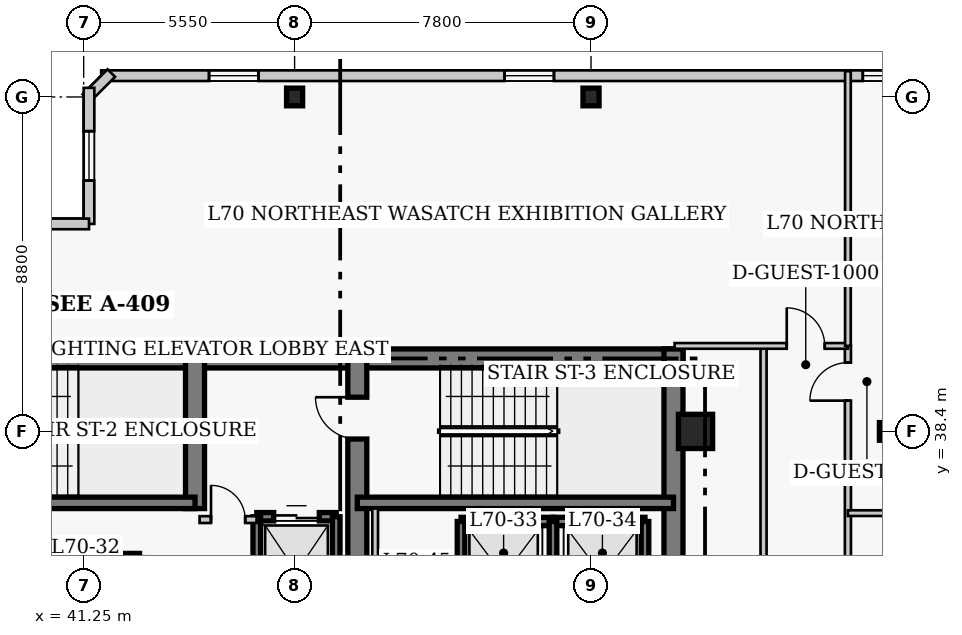
"""IFC4 building model, lengths in metres.
Left out: names, types, materials, properties, quantities, classifications, styles, units other than length and angle.
Written with IfcOpenShell. Run it as: python <this file> out.ifc"""

import sys

from ifc_helpers import new_model, si_unit, direction, frame, frame_2d, origin, origin_2d, place, context, subcontext, project, spatial, rectangle, i_section, extrude, element, fill, save


model = new_model("IFC4")
c1 = context("Model", 3, precision=1e-05, world=origin(), true_north=direction((0.0, 1.0)))
c2 = subcontext(c1, "Body", "Model", "MODEL_VIEW")
j1 = project(units=[si_unit("LENGTHUNIT", "METRE"), si_unit("PLANEANGLEUNIT", "RADIAN")], contexts=[c1])
p1 = place(None, origin())
s1 = spatial("IfcSite", under=j1, at=p1, CompositionType="ELEMENT")
p2 = place(p1, origin())
s2 = spatial("IfcBuilding", under=s1, at=p2, CompositionType="ELEMENT")
p3 = place(p2, frame((0.0, 0.0, 281.4)))
s3 = spatial("IfcBuildingStorey", under=s2, at=p3, CompositionType="ELEMENT", Elevation=281.4)
p4 = place(p3, frame((35.85, 40.32, 0.0), z_axis=(0.0, 0.0, 1.0), x_axis=(1.0, 0.0, 0.0)))
e1 = element("IfcWall", 1, at=p4, inside=s3, PredefinedType="SHEAR", context=c2, shape_type="SweptSolid", body=[
    extrude(rectangle(XDim=12.6, YDim=0.5, at=frame_2d((6.3, 0.0))), origin(), (0.0, 0.0, 1.0), 4.0),
])
p5 = place(p3, frame((48.45, 40.32, 0.0), z_axis=(0.0, 0.0, 1.0), x_axis=(1.0, 0.0, 0.0)))
e2 = element("IfcWall", 2, at=p5, inside=s3, PredefinedType="SHEAR", context=c2, shape_type="SweptSolid", body=[
    extrude(rectangle(XDim=8.57, YDim=0.5, at=frame_2d((4.285, 0.0))), origin(), (0.0, 0.0, 1.0), 4.0),
])
p6 = place(p3, frame((56.77, 27.05, 0.0), z_axis=(0.0, 0.0, 1.0), x_axis=(0.0, 1.0, 0.0)))
e3 = element("IfcWall", 3, at=p6, inside=s3, PredefinedType="SHEAR", context=c2, shape_type="SweptSolid", body=[
    extrude(rectangle(XDim=13.52, YDim=0.5, at=frame_2d((6.76, 0.0))), origin(), (0.0, 0.0, 1.0), 4.0),
])
p7 = place(p3, frame((44.18, 36.37, 0.0), z_axis=(0.0, 0.0, 1.0), x_axis=(0.0, 1.0, 0.0)))
e4 = element("IfcWall", 4, at=p7, inside=s3, PredefinedType="SHEAR", context=c2, shape_type="SweptSolid", body=[
    extrude(rectangle(XDim=3.95, YDim=0.5, at=frame_2d((1.975, 0.0))), origin(), (0.0, 0.0, 1.0), 4.0),
])
p8 = place(p3, frame((48.45, 32.5, 0.0), z_axis=(0.0, 0.0, 1.0), x_axis=(0.0, 1.0, 0.0)))
e5 = element("IfcWall", 5, at=p8, inside=s3, PredefinedType="SHEAR", context=c2, shape_type="SweptSolid", body=[
    extrude(rectangle(XDim=7.82, YDim=0.5, at=frame_2d((3.91, 0.0))), origin(), (0.0, 0.0, 1.0), 4.0),
])
p9 = place(p8, frame((5.7, 0.0, 0.0)))
e6 = element("IfcOpeningElement", 6, at=p9, cuts=e5, PredefinedType="OPENING", context=c2, shape_type="SweptSolid", body=[
    extrude(rectangle(XDim=1.1, YDim=2.15, at=frame_2d((0.55, 1.075))), frame((0.0, 0.26, 0.0), z_axis=(0.0, -1.0, 0.0), x_axis=(1.0, 0.0, 0.0)), (0.0, 0.0, 1.0), 0.52),
])
p10 = place(p3, frame((35.85, 36.52, 0.0), z_axis=(0.0, 0.0, 1.0), x_axis=(1.0, 0.0, 0.0)))
e7 = element("IfcWall", 7, at=p10, inside=s3, PredefinedType="SHEAR", context=c2, shape_type="SweptSolid", body=[
    extrude(rectangle(XDim=8.33, YDim=0.3, at=frame_2d((4.165, 0.0))), origin(), (0.0, 0.0, 1.0), 4.0),
])
p11 = place(p3, frame((48.45, 36.52, 0.0), z_axis=(0.0, 0.0, 1.0), x_axis=(1.0, 0.0, 0.0)))
e8 = element("IfcWall", 8, at=p11, inside=s3, PredefinedType="SHEAR", context=c2, shape_type="SweptSolid", body=[
    extrude(rectangle(XDim=8.32, YDim=0.3, at=frame_2d((4.16, 0.0))), origin(), (0.0, 0.0, 1.0), 4.0),
])
for number, where, z_axis, x_axis in (
    (9, (46.8, 47.2, 0.0), (0.0, 0.0, 1.0), (1.0, 0.0, 0.0)),
    (10, (54.6, 47.2, 0.0), (0.0, 0.0, 1.0), (1.0, 0.0, 0.0)),
    (11, (62.4, 38.4, 0.0), (0.0, 0.0, 1.0), (1.0, 0.0, 0.0)),
):
    element("IfcColumn", number, at=place(p3, frame(where, z_axis=z_axis, x_axis=x_axis)), inside=s3, PredefinedType="COLUMN", context=c2, shape_type="SweptSolid", body=[
        extrude(i_section(OverallWidth=0.422, OverallDepth=0.465, WebThickness=0.045, FlangeThickness=0.073, FilletRadius=0.017, at=origin_2d()), origin(), (0.0, 0.0, 1.0), 4.0),
    ])
p12 = place(p3, frame((57.35, 38.4, 0.0), z_axis=(0.0, 0.0, 1.0), x_axis=(1.0, 0.0, 0.0)))
e12 = element("IfcColumn", 12, at=p12, inside=s3, PredefinedType="COLUMN", context=c2, shape_type="SweptSolid", body=[
    extrude(rectangle(XDim=0.9, YDim=0.9, at=origin_2d()), origin(), (0.0, 0.0, 1.0), 4.0),
])
p13 = place(p3, frame((66.54, 47.76, 0.0), z_axis=(0.0, 0.0, 1.0), x_axis=(-1.0, 0.0, 0.0)))
e13 = element("IfcWall", 13, at=p13, inside=s3, PredefinedType="SOLIDWALL", context=c2, shape_type="SweptSolid", body=[
    extrude(rectangle(XDim=24.83, YDim=0.28, at=frame_2d((12.415, 0.0))), origin(), (0.0, 0.0, 1.0), 3.76),
])
p14 = place(p13, frame((3.488, 0.0, 0.85)))
e14 = element("IfcOpeningElement", 14, at=p14, cuts=e13, PredefinedType="OPENING", context=c2, shape_type="SweptSolid", body=[
    extrude(rectangle(XDim=1.3, YDim=1.7, at=frame_2d((0.65, 0.85))), frame((0.0, 0.15, 0.0), z_axis=(0.0, -1.0, 0.0), x_axis=(1.0, 0.0, 0.0)), (0.0, 0.0, 1.0), 0.3),
])
p15 = place(p13, frame((12.915, 0.0, 0.85)))
e15 = element("IfcOpeningElement", 15, at=p15, cuts=e13, PredefinedType="OPENING", context=c2, shape_type="SweptSolid", body=[
    extrude(rectangle(XDim=1.3, YDim=1.7, at=frame_2d((0.65, 0.85))), frame((0.0, 0.15, 0.0), z_axis=(0.0, -1.0, 0.0), x_axis=(1.0, 0.0, 0.0)), (0.0, 0.0, 1.0), 0.3),
])
p16 = place(p13, frame((20.692, 0.0, 0.85)))
e16 = element("IfcOpeningElement", 16, at=p16, cuts=e13, PredefinedType="OPENING", context=c2, shape_type="SweptSolid", body=[
    extrude(rectangle(XDim=1.3, YDim=1.7, at=frame_2d((0.65, 0.85))), frame((0.0, 0.15, 0.0), z_axis=(0.0, -1.0, 0.0), x_axis=(1.0, 0.0, 0.0)), (0.0, 0.0, 1.0), 0.3),
])
p17 = place(p3, frame((41.977, 47.829, 0.0), z_axis=(0.0, 0.0, 1.0), x_axis=(-0.706975312048, -0.707238225886, 0.0)))
e17 = element("IfcWall", 17, at=p17, inside=s3, PredefinedType="SOLIDWALL", context=c2, shape_type="SweptSolid", body=[
    extrude(rectangle(XDim=0.929, YDim=0.28, at=frame_2d((0.464, 0.0))), origin(), (0.0, 0.0, 1.0), 3.76),
])
p18 = place(p3, frame((41.39, 47.44, 0.0), z_axis=(0.0, 0.0, 1.0), x_axis=(0.0, -1.0, 0.0)))
e18 = element("IfcWall", 18, at=p18, inside=s3, PredefinedType="SOLIDWALL", context=c2, shape_type="SweptSolid", body=[
    extrude(rectangle(XDim=3.58, YDim=0.28, at=frame_2d((1.79, 0.0))), origin(), (0.0, 0.0, 1.0), 3.76),
])
p19 = place(p18, frame((1.14, 0.0, 0.85)))
e19 = element("IfcOpeningElement", 19, at=p19, cuts=e18, PredefinedType="OPENING", context=c2, shape_type="SweptSolid", body=[
    extrude(rectangle(XDim=1.3, YDim=1.7, at=frame_2d((0.65, 0.85))), frame((0.0, 0.15, 0.0), z_axis=(0.0, -1.0, 0.0), x_axis=(1.0, 0.0, 0.0)), (0.0, 0.0, 1.0), 0.3),
])
p20 = place(p3, frame((41.39, 43.86, 0.0), z_axis=(0.0, 0.0, 1.0), x_axis=(-1.0, 0.0, 0.0)))
e20 = element("IfcWall", 20, at=p20, inside=s3, PredefinedType="SOLIDWALL", context=c2, shape_type="SweptSolid", body=[
    extrude(rectangle(XDim=4.78, YDim=0.28, at=frame_2d((2.39, 0.0))), origin(), (0.0, 0.0, 1.0), 3.76),
])
p21 = place(p20, frame((1.74, 0.0, 0.85)))
e21 = element("IfcOpeningElement", 21, at=p21, cuts=e20, PredefinedType="OPENING", context=c2, shape_type="SweptSolid", body=[
    extrude(rectangle(XDim=1.3, YDim=1.7, at=frame_2d((0.65, 0.85))), frame((0.0, 0.15, 0.0), z_axis=(0.0, -1.0, 0.0), x_axis=(1.0, 0.0, 0.0)), (0.0, 0.0, 1.0), 0.3),
])
p22 = place(p3, frame((40.4, 35.08, 0.0), z_axis=(0.0, 0.0, 1.0), x_axis=(1.0, 0.0, 0.0)))
e22 = element("IfcWall", 22, at=p22, inside=s3, PredefinedType="SHEAR", context=c2, shape_type="SweptSolid", body=[
    extrude(rectangle(XDim=2.32, YDim=0.22, at=frame_2d((1.16, 0.0))), origin(), (0.0, 0.0, 1.0), 4.0),
])
p23 = place(p3, frame((51.18, 36.03, 0.0), z_axis=(0.0, 0.0, 1.0), x_axis=(1.0, 0.0, 0.0)))
e23 = element("IfcWall", 23, at=p23, inside=s3, PredefinedType="SHEAR", context=c2, shape_type="SweptSolid", body=[
    extrude(rectangle(XDim=2.42, YDim=0.22, at=frame_2d((1.21, 0.0))), origin(), (0.0, 0.0, 1.0), 4.0),
])
p24 = place(p3, frame((51.18, 33.17, 0.0), z_axis=(0.0, 0.0, 1.0), x_axis=(0.0, 1.0, 0.0)))
e24 = element("IfcWall", 24, at=p24, inside=s3, PredefinedType="SHEAR", context=c2, shape_type="SweptSolid", body=[
    extrude(rectangle(XDim=2.86, YDim=0.2, at=frame_2d((1.43, 0.0))), origin(), (0.0, 0.0, 1.0), 4.0),
])
p25 = place(p3, frame((53.6, 36.03, 0.0), z_axis=(0.0, 0.0, 1.0), x_axis=(1.0, 0.0, 0.0)))
e25 = element("IfcWall", 25, at=p25, inside=s3, PredefinedType="SHEAR", context=c2, shape_type="SweptSolid", body=[
    extrude(rectangle(XDim=2.42, YDim=0.22, at=frame_2d((1.21, 0.0))), origin(), (0.0, 0.0, 1.0), 4.0),
])
for number, where, z_axis, x_axis in (
    (26, (53.6, 33.17, 0.0), (0.0, 0.0, 1.0), (0.0, 1.0, 0.0)),
    (27, (56.02, 33.17, 0.0), (0.0, 0.0, 1.0), (0.0, 1.0, 0.0)),
):
    element("IfcWall", number, at=place(p3, frame(where, z_axis=z_axis, x_axis=x_axis)), inside=s3, PredefinedType="SHEAR", context=c2, shape_type="SweptSolid", body=[
        extrude(rectangle(XDim=2.86, YDim=0.2, at=frame_2d((1.43, 0.0))), origin(), (0.0, 0.0, 1.0), 4.0),
    ])
p26 = place(p3, frame((45.805, 36.155, 0.0), z_axis=(0.0, 0.0, 1.0), x_axis=(1.0, 0.0, 0.0)))
e28 = element("IfcWall", 28, at=p26, inside=s3, PredefinedType="SHEAR", context=c2, shape_type="SweptSolid", body=[
    extrude(rectangle(XDim=2.09, YDim=0.22, at=frame_2d((1.045, 0.0))), origin(), (0.0, 0.0, 1.0), 4.0),
])
p27 = place(p26, frame((0.445, 0.0, 0.0)))
e29 = element("IfcOpeningElement", 29, at=p27, cuts=e28, PredefinedType="OPENING", context=c2, shape_type="SweptSolid", body=[
    extrude(rectangle(XDim=1.2, YDim=2.15, at=frame_2d((0.6, 1.075))), frame((0.0, 0.12, 0.0), z_axis=(0.0, -1.0, 0.0), x_axis=(1.0, 0.0, 0.0)), (0.0, 0.0, 1.0), 0.24),
])
p28 = place(p3, frame((45.805, 32.65, 0.0), z_axis=(0.0, 0.0, 1.0), x_axis=(0.0, 1.0, 0.0)))
e30 = element("IfcWall", 30, at=p28, inside=s3, PredefinedType="SHEAR", context=c2, shape_type="SweptSolid", body=[
    extrude(rectangle(XDim=3.505, YDim=0.2, at=frame_2d((1.752, 0.0))), origin(), (0.0, 0.0, 1.0), 4.0),
])
p29 = place(p3, frame((47.895, 33.245, 0.0), z_axis=(0.0, 0.0, 1.0), x_axis=(0.0, 1.0, 0.0)))
e31 = element("IfcWall", 31, at=p29, inside=s3, PredefinedType="SHEAR", context=c2, shape_type="SweptSolid", body=[
    extrude(rectangle(XDim=2.91, YDim=0.2, at=frame_2d((1.455, 0.0))), origin(), (0.0, 0.0, 1.0), 4.0),
])
p30 = place(p3, frame((44.3, 36.08, 0.0), z_axis=(0.0, 0.0, 1.0), x_axis=(1.0, 0.0, 0.0)))
e32 = element("IfcWall", 32, at=p30, inside=s3, PredefinedType="PARTITIONING", context=c2, shape_type="SweptSolid", body=[
    extrude(rectangle(XDim=1.5, YDim=0.18, at=frame_2d((0.75, 0.0))), origin(), (0.0, 0.0, 1.0), 3.76),
])
p31 = place(p30, frame((0.3, 0.0, 0.0)))
e33 = element("IfcOpeningElement", 33, at=p31, cuts=e32, PredefinedType="OPENING", context=c2, shape_type="SweptSolid", body=[
    extrude(rectangle(XDim=0.9, YDim=2.15, at=frame_2d((0.45, 1.075))), frame((0.0, 0.1, 0.0), z_axis=(0.0, -1.0, 0.0), x_axis=(1.0, 0.0, 0.0)), (0.0, 0.0, 1.0), 0.2),
])
p32 = place(p3, frame((48.92, 32.75, 0.0), z_axis=(0.0, 0.0, 1.0), x_axis=(0.0, 1.0, 0.0)))
e34 = element("IfcWall", 34, at=p32, inside=s3, PredefinedType="PARTITIONING", context=c2, shape_type="SweptSolid", body=[
    extrude(rectangle(XDim=3.62, YDim=0.15, at=frame_2d((1.81, 0.0))), origin(), (0.0, 0.0, 1.0), 3.76),
])
p33 = place(p3, frame((61.36, 24.9, 0.0), z_axis=(0.0, 0.0, 1.0), x_axis=(0.0, 1.0, 0.0)))
e35 = element("IfcWall", 35, at=p33, inside=s3, PredefinedType="PARTITIONING", context=c2, shape_type="SweptSolid", body=[
    extrude(rectangle(XDim=15.75, YDim=0.16, at=frame_2d((7.875, 0.0))), origin(), (0.0, 0.0, 1.0), 3.76),
])
p34 = place(p33, frame((0.46, 0.0, 0.0)))
e36 = element("IfcOpeningElement", 36, at=p34, cuts=e35, PredefinedType="OPENING", context=c2, shape_type="SweptSolid", body=[
    extrude(rectangle(XDim=0.95, YDim=2.1, at=frame_2d((0.475, 1.05))), frame((0.0, 0.09, 0.0), z_axis=(0.0, -1.0, 0.0), x_axis=(1.0, 0.0, 0.0)), (0.0, 0.0, 1.0), 0.18),
])
p35 = place(p33, frame((14.31, 0.0, 0.0)))
e37 = element("IfcOpeningElement", 37, at=p35, cuts=e35, PredefinedType="OPENING", context=c2, shape_type="SweptSolid", body=[
    extrude(rectangle(XDim=1.0, YDim=2.15, at=frame_2d((0.5, 1.075))), frame((0.0, 0.09, 0.0), z_axis=(0.0, -1.0, 0.0), x_axis=(1.0, 0.0, 0.0)), (0.0, 0.0, 1.0), 0.18),
])
p36 = place(p3, frame((59.14, 27.06, 0.0), z_axis=(0.0, 0.0, 1.0), x_axis=(0.0, 1.0, 0.0)))
e38 = element("IfcWall", 38, at=p36, inside=s3, PredefinedType="PARTITIONING", context=c2, shape_type="SweptSolid", body=[
    extrude(rectangle(XDim=13.59, YDim=0.16, at=frame_2d((6.795, 0.0))), origin(), (0.0, 0.0, 1.0), 3.76),
])
p37 = place(p3, frame((56.8, 40.65, 0.0), z_axis=(0.0, 0.0, 1.0), x_axis=(1.0, 0.0, 0.0)))
e39 = element("IfcWall", 39, at=p37, inside=s3, PredefinedType="PARTITIONING", context=c2, shape_type="SweptSolid", body=[
    extrude(rectangle(XDim=4.56, YDim=0.15, at=frame_2d((2.28, 0.0))), origin(), (0.0, 0.0, 1.0), 3.76),
])
p38 = place(p37, frame((2.95, 0.0, 0.0)))
e40 = element("IfcOpeningElement", 40, at=p38, cuts=e39, PredefinedType="OPENING", context=c2, shape_type="SweptSolid", body=[
    extrude(rectangle(XDim=1.0, YDim=2.15, at=frame_2d((0.5, 1.075))), frame((0.0, 0.085, 0.0), z_axis=(0.0, -1.0, 0.0), x_axis=(1.0, 0.0, 0.0)), (0.0, 0.0, 1.0), 0.17),
])
p39 = place(p3, frame((61.36, 40.65, 0.0), z_axis=(0.0, 0.0, 1.0), x_axis=(0.0, 1.0, 0.0)))
e41 = element("IfcWall", 41, at=p39, inside=s3, PredefinedType="PARTITIONING", context=c2, shape_type="SweptSolid", body=[
    extrude(rectangle(XDim=7.23, YDim=0.15, at=frame_2d((3.615, 0.0))), origin(), (0.0, 0.0, 1.0), 3.76),
])
p40 = place(p3, frame((61.36, 36.25, 0.0), z_axis=(0.0, 0.0, 1.0), x_axis=(1.0, 0.0, 0.0)))
e42 = element("IfcWall", 42, at=p40, inside=s3, PredefinedType="PARTITIONING", context=c2, shape_type="SweptSolid", body=[
    extrude(rectangle(XDim=3.74, YDim=0.15, at=frame_2d((1.87, 0.0))), origin(), (0.0, 0.0, 1.0), 3.76),
])
p41 = place(p14, origin())
e43 = element("IfcWindow", 43, at=p41, inside=s3, PartitioningType="SINGLE_PANEL", PredefinedType="WINDOW", context=c2, shape_type="SweptSolid", body=[
    extrude(rectangle(XDim=1.3, YDim=1.7, at=frame_2d((0.65, 0.85))), frame((0.0, 0.03, 0.0), z_axis=(0.0, -1.0, 0.0), x_axis=(1.0, 0.0, 0.0)), (0.0, 0.0, 1.0), 0.06),
])
fill(e14, e43)
p42 = place(p15, origin())
e44 = element("IfcWindow", 44, at=p42, inside=s3, PartitioningType="SINGLE_PANEL", PredefinedType="WINDOW", context=c2, shape_type="SweptSolid", body=[
    extrude(rectangle(XDim=1.3, YDim=1.7, at=frame_2d((0.65, 0.85))), frame((0.0, 0.03, 0.0), z_axis=(0.0, -1.0, 0.0), x_axis=(1.0, 0.0, 0.0)), (0.0, 0.0, 1.0), 0.06),
])
fill(e15, e44)
p43 = place(p16, origin())
e45 = element("IfcWindow", 45, at=p43, inside=s3, PartitioningType="SINGLE_PANEL", PredefinedType="WINDOW", context=c2, shape_type="SweptSolid", body=[
    extrude(rectangle(XDim=1.3, YDim=1.7, at=frame_2d((0.65, 0.85))), frame((0.0, 0.03, 0.0), z_axis=(0.0, -1.0, 0.0), x_axis=(1.0, 0.0, 0.0)), (0.0, 0.0, 1.0), 0.06),
])
fill(e16, e45)
p44 = place(p19, origin())
e46 = element("IfcWindow", 46, at=p44, inside=s3, PartitioningType="SINGLE_PANEL", PredefinedType="WINDOW", context=c2, shape_type="SweptSolid", body=[
    extrude(rectangle(XDim=1.3, YDim=1.7, at=frame_2d((0.65, 0.85))), frame((0.0, 0.03, 0.0), z_axis=(0.0, -1.0, 0.0), x_axis=(1.0, 0.0, 0.0)), (0.0, 0.0, 1.0), 0.06),
])
fill(e19, e46)
p45 = place(p27, origin())
e47 = element("IfcDoor", 47, at=p45, inside=s3, OperationType="DOUBLE_DOOR_SLIDING", PredefinedType="DOOR", context=c2, shape_type="SweptSolid", body=[
    extrude(rectangle(XDim=1.2, YDim=2.15, at=frame_2d((0.6, 1.075))), frame((0.0, 0.025, 0.0), z_axis=(0.0, -1.0, 0.0), x_axis=(1.0, 0.0, 0.0)), (0.0, 0.0, 1.0), 0.05),
])
fill(e29, e47)
p46 = place(p31, origin())
e48 = element("IfcDoor", 48, at=p46, inside=s3, OperationType="SINGLE_SWING_LEFT", PredefinedType="DOOR", context=c2, shape_type="SweptSolid", body=[
    extrude(rectangle(XDim=0.9, YDim=2.15, at=frame_2d((0.45, 1.075))), frame((0.0, 0.025, 0.0), z_axis=(0.0, -1.0, 0.0), x_axis=(1.0, 0.0, 0.0)), (0.0, 0.0, 1.0), 0.05),
])
fill(e33, e48)
p47 = place(p38, origin())
e49 = element("IfcDoor", 49, at=p47, inside=s3, OperationType="SINGLE_SWING_LEFT", PredefinedType="DOOR", context=c2, shape_type="SweptSolid", body=[
    extrude(rectangle(XDim=1.0, YDim=2.15, at=frame_2d((0.5, 1.075))), frame((0.0, 0.025, 0.0), z_axis=(0.0, -1.0, 0.0), x_axis=(1.0, 0.0, 0.0)), (0.0, 0.0, 1.0), 0.05),
])
fill(e40, e49)
p48 = place(p35, origin())
e50 = element("IfcDoor", 50, at=p48, inside=s3, OperationType="SINGLE_SWING_LEFT", PredefinedType="DOOR", context=c2, shape_type="SweptSolid", body=[
    extrude(rectangle(XDim=1.0, YDim=2.15, at=frame_2d((0.5, 1.075))), frame((0.0, 0.025, 0.0), z_axis=(0.0, -1.0, 0.0), x_axis=(1.0, 0.0, 0.0)), (0.0, 0.0, 1.0), 0.05),
])
fill(e37, e50)
p49 = place(p9, origin())
e51 = element("IfcDoor", 51, at=p49, inside=s3, OperationType="SINGLE_SWING_RIGHT", PredefinedType="DOOR", context=c2, shape_type="SweptSolid", body=[
    extrude(rectangle(XDim=1.1, YDim=2.15, at=frame_2d((0.55, 1.075))), frame((0.0, 0.025, 0.0), z_axis=(0.0, -1.0, 0.0), x_axis=(1.0, 0.0, 0.0)), (0.0, 0.0, 1.0), 0.05),
])
fill(e6, e51)
save(model, sys.argv[1])
